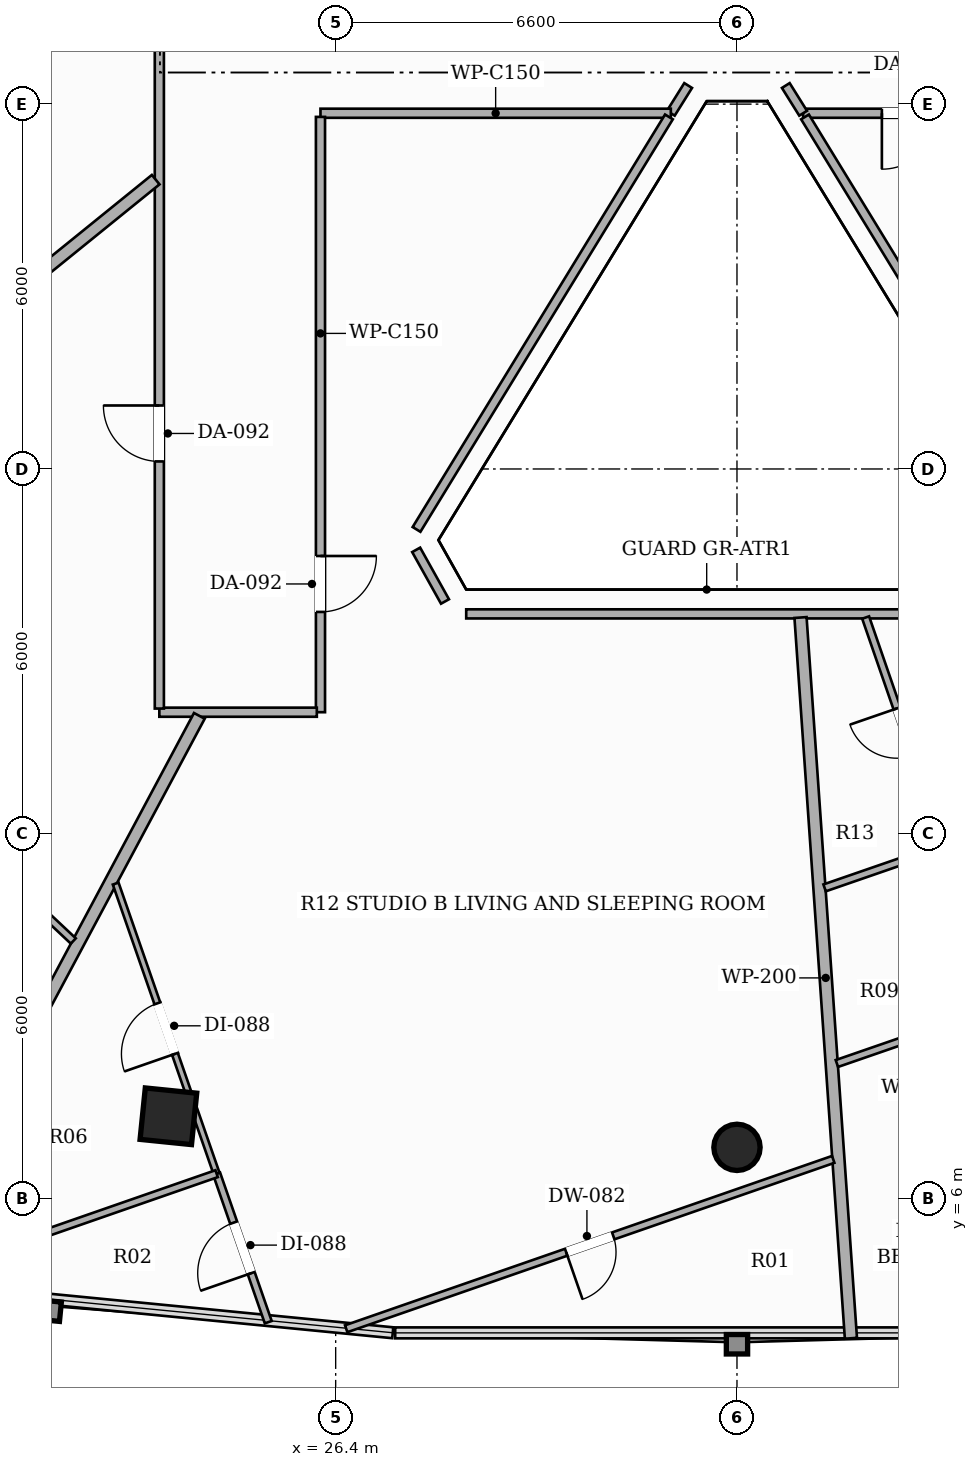
"""IFC4 building model, lengths in metres.
Left out: names, types, materials, properties, quantities, classifications, styles, units other than length and angle.
Written with IfcOpenShell. Run it as: python <this file> out.ifc"""

import sys

from ifc_helpers import new_model, si_unit, direction, frame, frame_2d, origin, origin_2d, place, context, subcontext, project, spatial, rectangle, hollow_rectangle, hollow_circle, extrude, element, fill, save


model = new_model("IFC4")
c1 = context("Model", 3, precision=1e-05, world=origin(), true_north=direction((0.0, 1.0)))
c2 = subcontext(c1, "Body", "Model", "MODEL_VIEW")
j1 = project(units=[si_unit("LENGTHUNIT", "METRE"), si_unit("PLANEANGLEUNIT", "RADIAN")], contexts=[c1])
p1 = place(None, origin())
s1 = spatial("IfcSite", under=j1, at=p1, CompositionType="ELEMENT")
p2 = place(p1, origin())
s2 = spatial("IfcBuilding", under=s1, at=p2, CompositionType="ELEMENT")
p3 = place(p2, frame((0.0, 0.0, 167.15)))
s3 = spatial("IfcBuildingStorey", under=s2, at=p3, CompositionType="ELEMENT", Elevation=167.15)
p4 = place(p3, frame((23.649, 7.355, 0.0), z_axis=(0.0, 0.0, 1.0), x_axis=(-0.994880708829, 0.101056297183, 0.0)))
e1 = element("IfcColumn", 1, at=p4, inside=s3, PredefinedType="COLUMN", context=c2, shape_type="SweptSolid", body=[
    extrude(hollow_rectangle(XDim=0.85, YDim=0.85, WallThickness=0.028, at=origin_2d()), origin(), (0.0, 0.0, 1.0), 3.3),
])
p5 = place(p3, frame((33.0, 6.844, 0.0), z_axis=(0.0, 0.0, 1.0), x_axis=(1.0, 0.0, 0.0)))
e2 = element("IfcColumn", 2, at=p5, inside=s3, PredefinedType="COLUMN", context=c2, shape_type="SweptSolid", body=[
    extrude(hollow_circle(Radius=0.381, WallThickness=0.022, at=origin_2d()), origin(), (0.0, 0.0, 1.0), 3.3),
])
p6 = place(p3, frame((32.197, 24.306, 0.0), z_axis=(0.0, 0.0, 1.0), x_axis=(-0.530039765459, -0.847972786728, 0.0)))
e3 = element("IfcWall", 3, at=p6, inside=s3, PredefinedType="PARTITIONING", context=c2, shape_type="SweptSolid", body=[
    extrude(rectangle(XDim=0.538, YDim=0.15, at=frame_2d((0.269, 0.0))), origin(), (0.0, 0.0, 1.0), 3.06),
])
p7 = place(p3, frame((31.912, 23.85, 0.0), z_axis=(0.0, 0.0, 1.0), x_axis=(-1.0, 0.0, 0.0)))
e4 = element("IfcWall", 4, at=p7, inside=s3, PredefinedType="PARTITIONING", context=c2, shape_type="SweptSolid", body=[
    extrude(rectangle(XDim=5.762, YDim=0.15, at=frame_2d((2.881, 0.0))), origin(), (0.0, 0.0, 1.0), 2.721),
])
p8 = place(p3, frame((26.15, 23.79, 0.0), z_axis=(0.0, 0.0, 1.0), x_axis=(0.0, -1.0, 0.0)))
e5 = element("IfcWall", 5, at=p8, inside=s3, PredefinedType="PARTITIONING", context=c2, shape_type="SweptSolid", body=[
    extrude(rectangle(XDim=9.79, YDim=0.15, at=frame_2d((4.895, 0.0))), origin(), (0.0, 0.0, 1.0), 2.721),
])
p9 = place(p8, frame((7.221, 0.0, 0.0)))
e6 = element("IfcOpeningElement", 6, at=p9, cuts=e5, PredefinedType="OPENING", context=c2, shape_type="SweptSolid", body=[
    extrude(rectangle(XDim=0.92, YDim=2.15, at=frame_2d((0.46, 1.075))), frame((0.0, 0.085, 0.0), z_axis=(0.0, -1.0, 0.0), x_axis=(1.0, 0.0, 0.0)), (0.0, 0.0, 1.0), 0.17),
])
p10 = place(p3, frame((26.09, 14.0, 0.0), z_axis=(0.0, 0.0, 1.0), x_axis=(-1.0, 0.0, 0.0)))
e7 = element("IfcWall", 7, at=p10, inside=s3, PredefinedType="PARTITIONING", context=c2, shape_type="SweptSolid", body=[
    extrude(rectangle(XDim=2.59, YDim=0.15, at=frame_2d((1.295, 0.0))), origin(), (0.0, 0.0, 1.0), 2.721),
])
p11 = place(p3, frame((23.5, 14.06, 0.0), z_axis=(0.0, 0.0, 1.0), x_axis=(0.0, 1.0, 0.0)))
e8 = element("IfcWall", 8, at=p11, inside=s3, PredefinedType="PARTITIONING", context=c2, shape_type="SweptSolid", body=[
    extrude(rectangle(XDim=22.84, YDim=0.15, at=frame_2d((11.42, 0.0))), origin(), (0.0, 0.0, 1.0), 2.413),
])
p12 = place(p11, frame((4.064, 0.0, 0.0)))
e9 = element("IfcOpeningElement", 9, at=p12, cuts=e8, PredefinedType="OPENING", context=c2, shape_type="SweptSolid", body=[
    extrude(rectangle(XDim=0.92, YDim=2.15, at=frame_2d((0.46, 1.075))), frame((0.0, 0.085, 0.0), z_axis=(0.0, -1.0, 0.0), x_axis=(1.0, 0.0, 0.0)), (0.0, 0.0, 1.0), 0.17),
])
p13 = place(p11, frame((13.047, 0.0, 0.0)))
e10 = element("IfcOpeningElement", 10, at=p13, cuts=e8, PredefinedType="OPENING", context=c2, shape_type="SweptSolid", body=[
    extrude(rectangle(XDim=0.88, YDim=2.1, at=frame_2d((0.44, 1.05))), frame((0.0, 0.085, 0.0), z_axis=(0.0, -1.0, 0.0), x_axis=(1.0, 0.0, 0.0)), (0.0, 0.0, 1.0), 0.17),
])
p14 = place(p11, frame((19.953, 0.0, 0.0)))
e11 = element("IfcOpeningElement", 11, at=p14, cuts=e8, PredefinedType="OPENING", context=c2, shape_type="SweptSolid", body=[
    extrude(rectangle(XDim=0.92, YDim=2.15, at=frame_2d((0.46, 1.075))), frame((0.0, 0.085, 0.0), z_axis=(0.0, -1.0, 0.0), x_axis=(1.0, 0.0, 0.0)), (0.0, 0.0, 1.0), 0.17),
])
p15 = place(p3, frame((42.29, 23.85, 0.0), z_axis=(0.0, 0.0, 1.0), x_axis=(-1.0, 0.0, 0.0)))
e12 = element("IfcWall", 12, at=p15, inside=s3, PredefinedType="PARTITIONING", context=c2, shape_type="SweptSolid", body=[
    extrude(rectangle(XDim=8.202, YDim=0.15, at=frame_2d((4.101, 0.0))), origin(), (0.0, 0.0, 1.0), 2.492),
])
p16 = place(p15, frame((5.987, 0.0, 0.0)))
e13 = element("IfcOpeningElement", 13, at=p16, cuts=e12, PredefinedType="OPENING", context=c2, shape_type="SweptSolid", body=[
    extrude(rectangle(XDim=0.92, YDim=2.15, at=frame_2d((0.46, 1.075))), frame((0.0, 0.085, 0.0), z_axis=(0.0, -1.0, 0.0), x_axis=(1.0, 0.0, 0.0)), (0.0, 0.0, 1.0), 0.17),
])
p17 = place(p15, frame((0.894, 0.0, 0.0)))
e14 = element("IfcOpeningElement", 14, at=p17, cuts=e12, PredefinedType="OPENING", context=c2, shape_type="SweptSolid", body=[
    extrude(rectangle(XDim=0.88, YDim=2.1, at=frame_2d((0.44, 1.05))), frame((0.0, 0.085, 0.0), z_axis=(0.0, -1.0, 0.0), x_axis=(1.0, 0.0, 0.0)), (0.0, 0.0, 1.0), 0.17),
])
p18 = place(p15, frame((3.169, 0.0, 0.0)))
e15 = element("IfcOpeningElement", 15, at=p18, cuts=e12, PredefinedType="OPENING", context=c2, shape_type="SweptSolid", body=[
    extrude(rectangle(XDim=0.88, YDim=2.1, at=frame_2d((0.44, 1.05))), frame((0.0, 0.085, 0.0), z_axis=(0.0, -1.0, 0.0), x_axis=(1.0, 0.0, 0.0)), (0.0, 0.0, 1.0), 0.17),
])
p19 = place(p3, frame((34.088, 23.85, 0.0), z_axis=(0.0, 0.0, 1.0), x_axis=(-0.530039765459, 0.847972786728, 0.0)))
e16 = element("IfcWall", 16, at=p19, inside=s3, PredefinedType="PARTITIONING", context=c2, shape_type="SweptSolid", body=[
    extrude(rectangle(XDim=0.538, YDim=0.15, at=frame_2d((0.269, 0.0))), origin(), (0.0, 0.0, 1.0), 3.06),
])
p20 = place(p3, frame((34.119, 23.79, 0.0), z_axis=(0.0, 0.0, 1.0), x_axis=(0.521942869651, -0.852980445744, 0.0)))
e17 = element("IfcWall", 17, at=p20, inside=s3, PredefinedType="PARTITIONING", context=c2, shape_type="SweptSolid", body=[
    extrude(rectangle(XDim=7.953, YDim=0.15, at=frame_2d((3.977, 0.0))), origin(), (0.0, 0.0, 1.0), 2.721),
])
p21 = place(p3, frame((37.453, 15.617, 0.0), z_axis=(0.0, 0.0, 1.0), x_axis=(-1.0, 0.0, 0.0)))
e18 = element("IfcWall", 18, at=p21, inside=s3, PredefinedType="PARTITIONING", context=c2, shape_type="SweptSolid", body=[
    extrude(rectangle(XDim=8.906, YDim=0.15, at=frame_2d((4.453, 0.0))), origin(), (0.0, 0.0, 1.0), 2.721),
])
p22 = place(p3, frame((28.198, 15.821, 0.0), z_axis=(0.0, 0.0, 1.0), x_axis=(-0.487432951818, 0.873160419099, 0.0)))
e19 = element("IfcWall", 19, at=p22, inside=s3, PredefinedType="PARTITIONING", context=c2, shape_type="SweptSolid", body=[
    extrude(rectangle(XDim=0.972, YDim=0.15, at=frame_2d((0.486, 0.0))), origin(), (0.0, 0.0, 1.0), 3.06),
])
p23 = place(p3, frame((27.73, 17.006, 0.0), z_axis=(0.0, 0.0, 1.0), x_axis=(0.521942869651, 0.852980445744, 0.0)))
e20 = element("IfcWall", 20, at=p23, inside=s3, PredefinedType="PARTITIONING", context=c2, shape_type="SweptSolid", body=[
    extrude(rectangle(XDim=7.953, YDim=0.15, at=frame_2d((3.977, 0.0))), origin(), (0.0, 0.0, 1.0), 2.721),
])
p24 = place(p3, frame((34.874, 3.704, 0.0), z_axis=(0.0, 0.0, 1.0), x_axis=(-0.069779440561, 0.997562443998, 0.0)))
e21 = element("IfcWall", 21, at=p24, inside=s3, PredefinedType="PARTITIONING", context=c2, shape_type="SweptSolid", body=[
    extrude(rectangle(XDim=11.882, YDim=0.2, at=frame_2d((5.941, 0.0))), origin(), (0.0, 0.0, 1.0), 2.413),
])
p25 = place(p3, frame((19.145, 4.55, 0.0), z_axis=(0.0, 0.0, 1.0), x_axis=(0.470953669838, 0.882157945533, 0.0)))
e22 = element("IfcWall", 22, at=p25, inside=s3, PredefinedType="PARTITIONING", context=c2, shape_type="SweptSolid", body=[
    extrude(rectangle(XDim=10.644, YDim=0.2, at=frame_2d((5.322, 0.0))), origin(), (0.0, 0.0, 1.0), 2.413),
])
p26 = place(p3, frame((8.887, 10.973, 0.0), z_axis=(0.0, 0.0, 1.0), x_axis=(0.777135864284, 0.629332859815, 0.0)))
e23 = element("IfcWall", 23, at=p26, inside=s3, PredefinedType="PARTITIONING", context=c2, shape_type="SweptSolid", body=[
    extrude(rectangle(XDim=18.726, YDim=0.2, at=frame_2d((9.363, 0.0))), origin(), (0.0, 0.0, 1.0), 2.413),
])
p27 = place(p3, frame((36.417, 11.794, 0.0), z_axis=(0.0, 0.0, 1.0), x_axis=(-0.326767254884, 0.945104841346, 0.0)))
e24 = element("IfcWall", 24, at=p27, inside=s3, PredefinedType="PARTITIONING", context=c2, shape_type="SweptSolid", body=[
    extrude(rectangle(XDim=3.981, YDim=0.12, at=frame_2d((1.991, 0.0))), origin(), (0.0, 0.0, 1.0), 3.06),
])
p28 = place(p27, frame((1.581, 0.0, 0.0)))
e25 = element("IfcOpeningElement", 25, at=p28, cuts=e24, PredefinedType="OPENING", context=c2, shape_type="SweptSolid", body=[
    extrude(rectangle(XDim=0.82, YDim=2.1, at=frame_2d((0.41, 1.05))), frame((0.0, 0.07, 0.0), z_axis=(0.0, -1.0, 0.0), x_axis=(1.0, 0.0, 0.0)), (0.0, 0.0, 1.0), 0.14),
])
p29 = place(p3, frame((36.417, 11.794, 0.0), z_axis=(0.0, 0.0, 1.0), x_axis=(-0.945158093584, -0.326613193446, 0.0)))
e26 = element("IfcWall", 26, at=p29, inside=s3, PredefinedType="PARTITIONING", context=c2, shape_type="SweptSolid", body=[
    extrude(rectangle(XDim=2.091, YDim=0.12, at=frame_2d((1.045, 0.0))), origin(), (0.0, 0.0, 1.0), 3.06),
])
p30 = place(p3, frame((37.33, 9.152, 0.0), z_axis=(0.0, 0.0, 1.0), x_axis=(-0.945086078656, -0.326821516933, 0.0)))
e27 = element("IfcWall", 27, at=p30, inside=s3, PredefinedType="PARTITIONING", context=c2, shape_type="SweptSolid", body=[
    extrude(rectangle(XDim=2.843, YDim=0.12, at=frame_2d((1.422, 0.0))), origin(), (0.0, 0.0, 1.0), 2.721),
])
p31 = place(p3, frame((34.583, 6.646, 0.0), z_axis=(0.0, 0.0, 1.0), x_axis=(-0.944539899325, -0.328396678704, 0.0)))
e28 = element("IfcWall", 28, at=p31, inside=s3, PredefinedType="PARTITIONING", context=c2, shape_type="SweptSolid", body=[
    extrude(rectangle(XDim=8.48, YDim=0.12, at=frame_2d((4.24, 0.0))), origin(), (0.0, 0.0, 1.0), 2.413),
])
p32 = place(p31, frame((3.83, 0.0, 0.0)))
e29 = element("IfcOpeningElement", 29, at=p32, cuts=e28, PredefinedType="OPENING", context=c2, shape_type="SweptSolid", body=[
    extrude(rectangle(XDim=0.82, YDim=2.1, at=frame_2d((0.41, 1.05))), frame((0.0, 0.07, 0.0), z_axis=(0.0, -1.0, 0.0), x_axis=(1.0, 0.0, 0.0)), (0.0, 0.0, 1.0), 0.14),
])
p33 = place(p3, frame((25.291, 3.969, 0.0), z_axis=(0.0, 0.0, 1.0), x_axis=(-0.328440044658, 0.944524820778, 0.0)))
e30 = element("IfcWall", 30, at=p33, inside=s3, PredefinedType="PARTITIONING", context=c2, shape_type="SweptSolid", body=[
    extrude(rectangle(XDim=2.585, YDim=0.12, at=frame_2d((1.292, 0.0))), origin(), (0.0, 0.0, 1.0), 3.06),
])
p34 = place(p33, frame((0.853, 0.0, 0.0)))
e31 = element("IfcOpeningElement", 31, at=p34, cuts=e30, PredefinedType="OPENING", context=c2, shape_type="SweptSolid", body=[
    extrude(rectangle(XDim=0.88, YDim=2.1, at=frame_2d((0.44, 1.05))), frame((0.0, 0.07, 0.0), z_axis=(0.0, -1.0, 0.0), x_axis=(1.0, 0.0, 0.0)), (0.0, 0.0, 1.0), 0.14),
])
p35 = place(p3, frame((24.442, 6.411, 0.0), z_axis=(0.0, 0.0, 1.0), x_axis=(-0.328597479572, 0.944470061155, 0.0)))
e32 = element("IfcWall", 32, at=p35, inside=s3, PredefinedType="PARTITIONING", context=c2, shape_type="SweptSolid", body=[
    extrude(rectangle(XDim=5.052, YDim=0.1, at=frame_2d((2.526, 0.0))), origin(), (0.0, 0.0, 1.0), 2.413),
])
p36 = place(p35, frame((2.086, 0.0, 0.0)))
e33 = element("IfcOpeningElement", 33, at=p36, cuts=e32, PredefinedType="OPENING", context=c2, shape_type="SweptSolid", body=[
    extrude(rectangle(XDim=0.88, YDim=2.1, at=frame_2d((0.44, 1.05))), frame((0.0, 0.06, 0.0), z_axis=(0.0, -1.0, 0.0), x_axis=(1.0, 0.0, 0.0)), (0.0, 0.0, 1.0), 0.12),
])
p37 = place(p3, frame((19.276, 4.614, 0.0), z_axis=(0.0, 0.0, 1.0), x_axis=(0.944496796706, 0.328520624941, 0.0)))
e34 = element("IfcWall", 34, at=p37, inside=s3, PredefinedType="PARTITIONING", context=c2, shape_type="SweptSolid", body=[
    extrude(rectangle(XDim=5.469, YDim=0.12, at=frame_2d((2.735, 0.0))), origin(), (0.0, 0.0, 1.0), 2.619),
])
p38 = place(p3, frame((22.085, 10.238, 0.0), z_axis=(0.0, 0.0, 1.0), x_axis=(-0.728663547615, 0.684871837921, 0.0)))
e35 = element("IfcWall", 35, at=p38, inside=s3, PredefinedType="PARTITIONING", context=c2, shape_type="SweptSolid", body=[
    extrude(rectangle(XDim=2.241, YDim=0.12, at=frame_2d((1.121, 0.0))), origin(), (0.0, 0.0, 1.0), 2.721),
])
p39 = place(p16, origin())
e36 = element("IfcDoor", 36, at=p39, inside=s3, OperationType="SINGLE_SWING_RIGHT", PredefinedType="DOOR", context=c2, shape_type="SweptSolid", body=[
    extrude(rectangle(XDim=0.92, YDim=2.15, at=frame_2d((0.46, 1.075))), frame((0.0, 0.025, 0.0), z_axis=(0.0, -1.0, 0.0), x_axis=(1.0, 0.0, 0.0)), (0.0, 0.0, 1.0), 0.05),
])
fill(e13, e36)
p40 = place(p28, origin())
e37 = element("IfcDoor", 37, at=p40, inside=s3, OperationType="SINGLE_SWING_RIGHT", PredefinedType="DOOR", context=c2, shape_type="SweptSolid", body=[
    extrude(rectangle(XDim=0.82, YDim=2.1, at=frame_2d((0.41, 1.05))), frame((0.0, 0.025, 0.0), z_axis=(0.0, -1.0, 0.0), x_axis=(1.0, 0.0, 0.0)), (0.0, 0.0, 1.0), 0.05),
])
fill(e25, e37)
p41 = place(p9, origin())
e38 = element("IfcDoor", 38, at=p41, inside=s3, OperationType="SINGLE_SWING_LEFT", PredefinedType="DOOR", context=c2, shape_type="SweptSolid", body=[
    extrude(rectangle(XDim=0.92, YDim=2.15, at=frame_2d((0.46, 1.075))), frame((0.0, 0.025, 0.0), z_axis=(0.0, -1.0, 0.0), x_axis=(1.0, 0.0, 0.0)), (0.0, 0.0, 1.0), 0.05),
])
fill(e6, e38)
p42 = place(p32, origin())
e39 = element("IfcDoor", 39, at=p42, inside=s3, OperationType="SINGLE_SWING_RIGHT", PredefinedType="DOOR", context=c2, shape_type="SweptSolid", body=[
    extrude(rectangle(XDim=0.82, YDim=2.1, at=frame_2d((0.41, 1.05))), frame((0.0, 0.025, 0.0), z_axis=(0.0, -1.0, 0.0), x_axis=(1.0, 0.0, 0.0)), (0.0, 0.0, 1.0), 0.05),
])
fill(e29, e39)
p43 = place(p34, origin())
e40 = element("IfcDoor", 40, at=p43, inside=s3, OperationType="SINGLE_SWING_LEFT", PredefinedType="DOOR", context=c2, shape_type="SweptSolid", body=[
    extrude(rectangle(XDim=0.88, YDim=2.1, at=frame_2d((0.44, 1.05))), frame((0.0, 0.025, 0.0), z_axis=(0.0, -1.0, 0.0), x_axis=(1.0, 0.0, 0.0)), (0.0, 0.0, 1.0), 0.05),
])
fill(e31, e40)
p44 = place(p36, origin())
e41 = element("IfcDoor", 41, at=p44, inside=s3, OperationType="SINGLE_SWING_LEFT", PredefinedType="DOOR", context=c2, shape_type="SweptSolid", body=[
    extrude(rectangle(XDim=0.88, YDim=2.1, at=frame_2d((0.44, 1.05))), frame((0.0, 0.025, 0.0), z_axis=(0.0, -1.0, 0.0), x_axis=(1.0, 0.0, 0.0)), (0.0, 0.0, 1.0), 0.05),
])
fill(e33, e41)
p45 = place(p12, origin())
e42 = element("IfcDoor", 42, at=p45, inside=s3, OperationType="SINGLE_SWING_RIGHT", PredefinedType="DOOR", context=c2, shape_type="SweptSolid", body=[
    extrude(rectangle(XDim=0.92, YDim=2.15, at=frame_2d((0.46, 1.075))), frame((0.0, 0.025, 0.0), z_axis=(0.0, -1.0, 0.0), x_axis=(1.0, 0.0, 0.0)), (0.0, 0.0, 1.0), 0.05),
])
fill(e9, e42)
save(model, sys.argv[1])
